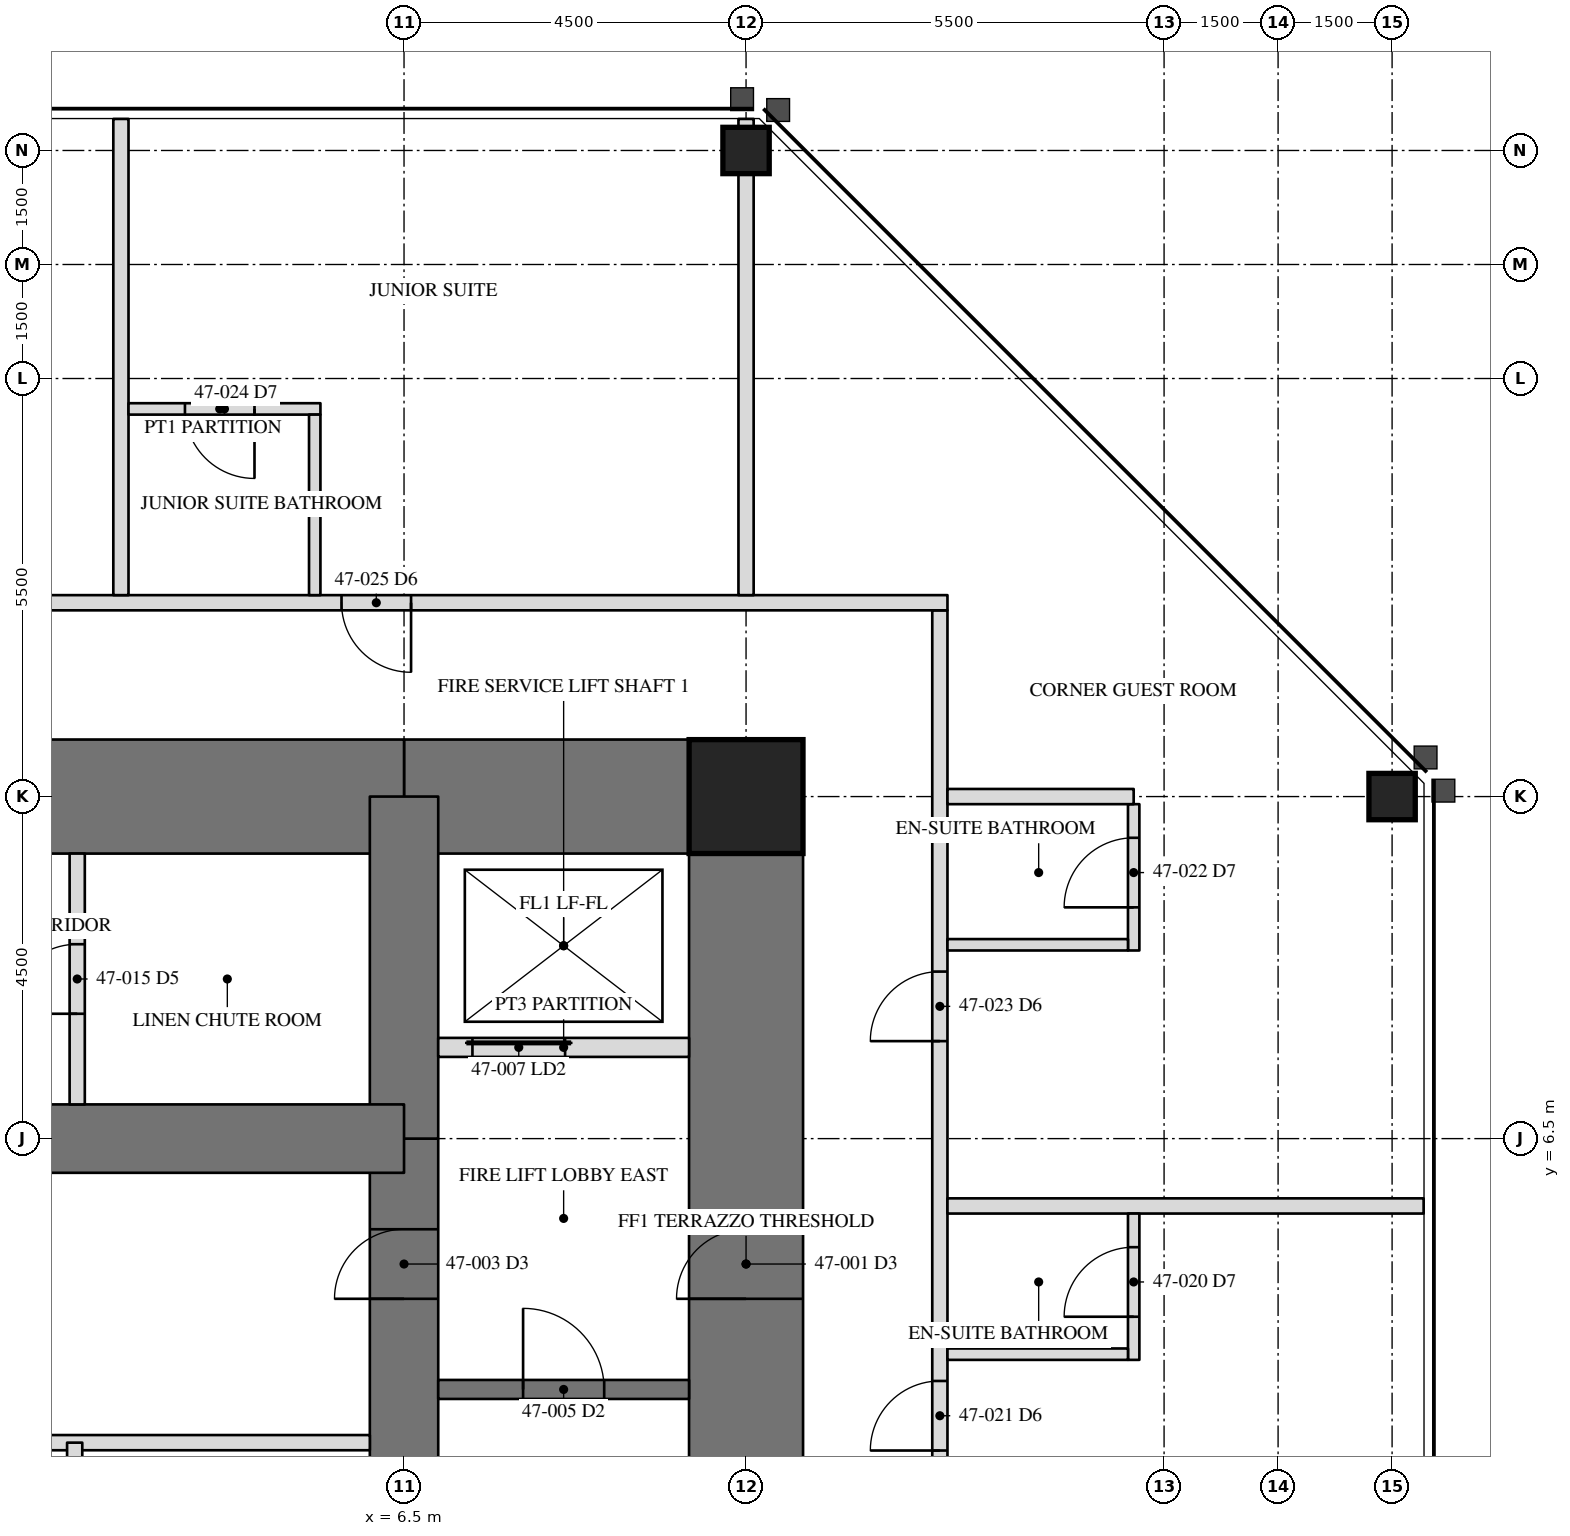
"""IFC4 building model, lengths in metres.
Left out: names, types, materials, properties, quantities, classifications, styles, units other than length and angle.
Written with IfcOpenShell. Run it as: python <this file> out.ifc"""

import sys

from ifc_helpers import new_model, si_unit, direction, frame, frame_2d, origin, origin_2d, place, context, subcontext, project, spatial, rectangle, hollow_rectangle, extrude, element, fill, save


model = new_model("IFC4")
c1 = context("Model", 3, precision=1e-05, world=origin(), true_north=direction((0.0, 1.0)))
c2 = subcontext(c1, "Body", "Model", "MODEL_VIEW")
j1 = project(units=[si_unit("LENGTHUNIT", "METRE"), si_unit("PLANEANGLEUNIT", "RADIAN")], contexts=[c1])
p1 = place(None, origin())
s1 = spatial("IfcSite", under=j1, at=p1, CompositionType="ELEMENT")
p2 = place(p1, origin())
s2 = spatial("IfcBuilding", under=s1, at=p2, CompositionType="ELEMENT")
p3 = place(p2, frame((0.0, 0.0, 201.2)))
s3 = spatial("IfcBuildingStorey", under=s2, at=p3, CompositionType="ELEMENT", Elevation=201.2)
for number, where, z_axis, x_axis in (
    (1, (19.5, 11.0, 0.0), (0.0, 0.0, 1.0), (0.0, 1.0, 0.0)),
    (2, (11.0, 19.5, 0.0), (0.0, 0.0, 1.0), (1.0, 0.0, 0.0)),
):
    element("IfcColumn", number, at=place(p3, frame(where, z_axis=z_axis, x_axis=x_axis)), inside=s3, PredefinedType="COLUMN", context=c2, shape_type="SweptSolid", body=[
        extrude(hollow_rectangle(XDim=0.61, YDim=0.61, WallThickness=0.076, at=origin_2d()), origin(), (0.0, 0.0, 1.0), 3.5),
    ])
p4 = place(p3, frame((11.0, -11.0, 0.0), z_axis=(0.0, 0.0, 1.0), x_axis=(0.0, 1.0, 0.0)))
e3 = element("IfcWall", 3, at=p4, inside=s3, PredefinedType="SHEAR", context=c2, shape_type="SweptSolid", body=[
    extrude(rectangle(XDim=22.0, YDim=1.5, at=frame_2d((11.0, 0.0))), origin(), (0.0, 0.0, 1.0), 3.5),
])
p5 = place(p4, frame((15.393, 0.0, 0.0)))
e4 = element("IfcOpeningElement", 4, at=p5, cuts=e3, PredefinedType="OPENING", context=c2, shape_type="SweptSolid", body=[
    extrude(rectangle(XDim=0.915, YDim=2.134, at=frame_2d((0.458, 1.067))), frame((0.0, 0.76, 0.0), z_axis=(0.0, -1.0, 0.0), x_axis=(1.0, 0.0, 0.0)), (0.0, 0.0, 1.0), 1.52),
])
p6 = place(p3, frame((11.0, 11.0, 0.0), z_axis=(0.0, 0.0, 1.0), x_axis=(-1.0, 0.0, 0.0)))
e5 = element("IfcWall", 5, at=p6, inside=s3, PredefinedType="SHEAR", context=c2, shape_type="SweptSolid", body=[
    extrude(rectangle(XDim=4.5, YDim=1.5, at=frame_2d((2.25, 0.0))), origin(), (0.0, 0.0, 1.0), 3.5),
])
p7 = place(p3, frame((6.5, 11.0, 0.0), z_axis=(0.0, 0.0, 1.0), x_axis=(-1.0, 0.0, 0.0)))
e6 = element("IfcWall", 6, at=p7, inside=s3, PredefinedType="SHEAR", context=c2, shape_type="SweptSolid", body=[
    extrude(rectangle(XDim=13.0, YDim=1.5, at=frame_2d((6.5, 0.0))), origin(), (0.0, 0.0, 1.0), 3.5),
])
p8 = place(p7, frame((6.042, 0.0, 0.0)))
e7 = element("IfcOpeningElement", 7, at=p8, cuts=e6, PredefinedType="OPENING", context=c2, shape_type="SweptSolid", body=[
    extrude(rectangle(XDim=0.915, YDim=2.134, at=frame_2d((0.458, 1.067))), frame((0.0, 0.76, 0.0), z_axis=(0.0, -1.0, 0.0), x_axis=(1.0, 0.0, 0.0)), (0.0, 0.0, 1.0), 1.52),
])
p9 = place(p3, frame((6.5, -6.5, 0.0), z_axis=(0.0, 0.0, 1.0), x_axis=(0.0, 1.0, 0.0)))
e8 = element("IfcWall", 8, at=p9, inside=s3, PredefinedType="SHEAR", context=c2, shape_type="SweptSolid", body=[
    extrude(rectangle(XDim=13.0, YDim=0.9, at=frame_2d((6.5, 0.0))), origin(), (0.0, 0.0, 1.0), 3.5),
])
p10 = place(p9, frame((10.893, 0.0, 0.0)))
e9 = element("IfcOpeningElement", 9, at=p10, cuts=e8, PredefinedType="OPENING", context=c2, shape_type="SweptSolid", body=[
    extrude(rectangle(XDim=0.915, YDim=2.134, at=frame_2d((0.458, 1.067))), frame((0.0, 0.46, 0.0), z_axis=(0.0, -1.0, 0.0), x_axis=(1.0, 0.0, 0.0)), (0.0, 0.0, 1.0), 0.92),
])
p11 = place(p9, frame((0.61, 0.0, 0.0)))
e10 = element("IfcOpeningElement", 10, at=p11, cuts=e8, PredefinedType="OPENING", context=c2, shape_type="SweptSolid", body=[
    extrude(rectangle(XDim=0.915, YDim=2.134, at=frame_2d((0.458, 1.067))), frame((0.0, 0.46, 0.0), z_axis=(0.0, -1.0, 0.0), x_axis=(1.0, 0.0, 0.0)), (0.0, 0.0, 1.0), 0.92),
])
p12 = place(p3, frame((6.5, 6.5, 0.0), z_axis=(0.0, 0.0, 1.0), x_axis=(0.0, 1.0, 0.0)))
e11 = element("IfcWall", 11, at=p12, inside=s3, PredefinedType="SHEAR", context=c2, shape_type="SweptSolid", body=[
    extrude(rectangle(XDim=4.5, YDim=0.9, at=frame_2d((2.25, 0.0))), origin(), (0.0, 0.0, 1.0), 3.5),
])
p13 = place(p3, frame((6.5, 6.5, 0.0), z_axis=(0.0, 0.0, 1.0), x_axis=(-1.0, 0.0, 0.0)))
e12 = element("IfcWall", 12, at=p13, inside=s3, PredefinedType="SHEAR", context=c2, shape_type="SweptSolid", body=[
    extrude(rectangle(XDim=13.0, YDim=0.9, at=frame_2d((6.5, 0.0))), origin(), (0.0, 0.0, 1.0), 3.5),
])
p14 = place(p3, frame((11.0, 11.0, 0.0), z_axis=(0.0, 0.0, 1.0), x_axis=(1.0, 0.0, 0.0)))
e13 = element("IfcColumn", 13, at=p14, inside=s3, PredefinedType="COLUMN", context=c2, shape_type="SweptSolid", body=[
    extrude(hollow_rectangle(XDim=1.499, YDim=1.499, WallThickness=0.102, at=origin_2d()), origin(), (0.0, 0.0, 1.0), 3.5),
])
p15 = place(p3, frame((6.95, 3.2, 0.0), z_axis=(0.0, 0.0, 1.0), x_axis=(1.0, 0.0, 0.0)))
e14 = element("IfcWall", 14, at=p15, inside=s3, PredefinedType="SOLIDWALL", context=c2, shape_type="SweptSolid", body=[
    extrude(rectangle(XDim=3.3, YDim=0.25, at=frame_2d((1.65, 0.0))), origin(), (0.0, 0.0, 1.0), 3.31),
])
p16 = place(p15, frame((1.116, 0.0, 0.0)))
e15 = element("IfcOpeningElement", 15, at=p16, cuts=e14, PredefinedType="OPENING", context=c2, shape_type="SweptSolid", body=[
    extrude(rectangle(XDim=1.067, YDim=2.134, at=frame_2d((0.533, 1.067))), frame((0.0, 0.135, 0.0), z_axis=(0.0, -1.0, 0.0), x_axis=(1.0, 0.0, 0.0)), (0.0, 0.0, 1.0), 0.27),
])
p17 = place(p3, frame((6.95, 7.7, 0.0), z_axis=(0.0, 0.0, 1.0), x_axis=(1.0, 0.0, 0.0)))
e16 = element("IfcWall", 16, at=p17, inside=s3, PredefinedType="PARTITIONING", context=c2, shape_type="SweptSolid", body=[
    extrude(rectangle(XDim=3.3, YDim=0.25, at=frame_2d((1.65, 0.0))), origin(), (0.0, 0.0, 1.0), 3.31),
])
p18 = place(p17, frame((0.45, 0.0, 0.0)))
e17 = element("IfcOpeningElement", 17, at=p18, cuts=e16, PredefinedType="OPENING", context=c2, shape_type="SweptSolid", body=[
    extrude(rectangle(XDim=1.219, YDim=2.134, at=frame_2d((0.609, 1.067))), frame((0.0, 0.135, 0.0), z_axis=(0.0, -1.0, 0.0), x_axis=(1.0, 0.0, 0.0)), (0.0, 0.0, 1.0), 0.27),
])
p19 = place(p3, frame((-6.05, 2.5, 0.0), z_axis=(0.0, 0.0, 1.0), x_axis=(1.0, 0.0, 0.0)))
e18 = element("IfcWall", 18, at=p19, inside=s3, PredefinedType="PARTITIONING", context=c2, shape_type="SweptSolid", body=[
    extrude(rectangle(XDim=12.1, YDim=0.2, at=frame_2d((6.05, 0.0))), origin(), (0.0, 0.0, 1.0), 3.31),
])
p20 = place(p3, frame((2.167, -2.5, 0.0), z_axis=(0.0, 0.0, 1.0), x_axis=(0.0, 1.0, 0.0)))
e19 = element("IfcWall", 19, at=p20, inside=s3, PredefinedType="PARTITIONING", context=c2, shape_type="SweptSolid", body=[
    extrude(rectangle(XDim=5.0, YDim=0.2, at=frame_2d((2.5, 0.0))), origin(), (0.0, 0.0, 1.0), 3.31),
])
p21 = place(p3, frame((2.2, 6.95, 0.0), z_axis=(0.0, 0.0, 1.0), x_axis=(0.0, 1.0, 0.0)))
e20 = element("IfcWall", 20, at=p21, inside=s3, PredefinedType="PARTITIONING", context=c2, shape_type="SweptSolid", body=[
    extrude(rectangle(XDim=3.3, YDim=0.2, at=frame_2d((1.65, 0.0))), origin(), (0.0, 0.0, 1.0), 3.31),
])
p22 = place(p21, frame((1.192, 0.0, 0.0)))
e21 = element("IfcOpeningElement", 21, at=p22, cuts=e20, PredefinedType="OPENING", context=c2, shape_type="SweptSolid", body=[
    extrude(rectangle(XDim=0.915, YDim=2.134, at=frame_2d((0.458, 1.067))), frame((0.0, 0.11, 0.0), z_axis=(0.0, -1.0, 0.0), x_axis=(1.0, 0.0, 0.0)), (0.0, 0.0, 1.0), 0.22),
])
p23 = place(p3, frame((13.55, -13.65, 0.0), z_axis=(0.0, 0.0, 1.0), x_axis=(0.0, 1.0, 0.0)))
e22 = element("IfcWall", 22, at=p23, inside=s3, PredefinedType="PARTITIONING", context=c2, shape_type="SweptSolid", body=[
    extrude(rectangle(XDim=27.1, YDim=0.2, at=frame_2d((13.55, 0.0))), origin(), (0.0, 0.0, 1.0), 3.31),
])
p24 = place(p23, frame((4.283, 0.0, 0.0)))
e23 = element("IfcOpeningElement", 23, at=p24, cuts=e22, PredefinedType="OPENING", context=c2, shape_type="SweptSolid", body=[
    extrude(rectangle(XDim=0.915, YDim=2.134, at=frame_2d((0.458, 1.067))), frame((0.0, 0.11, 0.0), z_axis=(0.0, -1.0, 0.0), x_axis=(1.0, 0.0, 0.0)), (0.0, 0.0, 1.0), 0.22),
])
p25 = place(p23, frame((10.433, 0.0, 0.0)))
e24 = element("IfcOpeningElement", 24, at=p25, cuts=e22, PredefinedType="OPENING", context=c2, shape_type="SweptSolid", body=[
    extrude(rectangle(XDim=0.915, YDim=2.134, at=frame_2d((0.458, 1.067))), frame((0.0, 0.11, 0.0), z_axis=(0.0, -1.0, 0.0), x_axis=(1.0, 0.0, 0.0)), (0.0, 0.0, 1.0), 0.22),
])
p26 = place(p23, frame((16.046, 0.0, 0.0)))
e25 = element("IfcOpeningElement", 25, at=p26, cuts=e22, PredefinedType="OPENING", context=c2, shape_type="SweptSolid", body=[
    extrude(rectangle(XDim=0.915, YDim=2.134, at=frame_2d((0.458, 1.067))), frame((0.0, 0.11, 0.0), z_axis=(0.0, -1.0, 0.0), x_axis=(1.0, 0.0, 0.0)), (0.0, 0.0, 1.0), 0.22),
])
p27 = place(p23, frame((21.433, 0.0, 0.0)))
e26 = element("IfcOpeningElement", 26, at=p27, cuts=e22, PredefinedType="OPENING", context=c2, shape_type="SweptSolid", body=[
    extrude(rectangle(XDim=0.915, YDim=2.134, at=frame_2d((0.458, 1.067))), frame((0.0, 0.11, 0.0), z_axis=(0.0, -1.0, 0.0), x_axis=(1.0, 0.0, 0.0)), (0.0, 0.0, 1.0), 0.22),
])
p28 = place(p3, frame((13.65, 13.55, 0.0), z_axis=(0.0, 0.0, 1.0), x_axis=(-1.0, 0.0, 0.0)))
e27 = element("IfcWall", 27, at=p28, inside=s3, PredefinedType="PARTITIONING", context=c2, shape_type="SweptSolid", body=[
    extrude(rectangle(XDim=27.1, YDim=0.2, at=frame_2d((13.55, 0.0))), origin(), (0.0, 0.0, 1.0), 3.31),
])
p29 = place(p28, frame((7.058, 0.0, 0.0)))
e28 = element("IfcOpeningElement", 28, at=p29, cuts=e27, PredefinedType="OPENING", context=c2, shape_type="SweptSolid", body=[
    extrude(rectangle(XDim=0.915, YDim=2.134, at=frame_2d((0.458, 1.067))), frame((0.0, 0.11, 0.0), z_axis=(0.0, -1.0, 0.0), x_axis=(1.0, 0.0, 0.0)), (0.0, 0.0, 1.0), 0.22),
])
p30 = place(p28, frame((13.24, 0.0, 0.0)))
e29 = element("IfcOpeningElement", 29, at=p30, cuts=e27, PredefinedType="OPENING", context=c2, shape_type="SweptSolid", body=[
    extrude(rectangle(XDim=0.915, YDim=2.134, at=frame_2d((0.458, 1.067))), frame((0.0, 0.11, 0.0), z_axis=(0.0, -1.0, 0.0), x_axis=(1.0, 0.0, 0.0)), (0.0, 0.0, 1.0), 0.22),
])
p31 = place(p28, frame((20.833, 0.0, 0.0)))
e30 = element("IfcOpeningElement", 30, at=p31, cuts=e27, PredefinedType="OPENING", context=c2, shape_type="SweptSolid", body=[
    extrude(rectangle(XDim=0.915, YDim=2.134, at=frame_2d((0.458, 1.067))), frame((0.0, 0.11, 0.0), z_axis=(0.0, -1.0, 0.0), x_axis=(1.0, 0.0, 0.0)), (0.0, 0.0, 1.0), 0.22),
])
p32 = place(p3, frame((13.65, 5.614, 0.0), z_axis=(0.0, 0.0, 1.0), x_axis=(1.0, 0.0, 0.0)))
e31 = element("IfcWall", 31, at=p32, inside=s3, PredefinedType="PARTITIONING", context=c2, shape_type="SweptSolid", body=[
    extrude(rectangle(XDim=6.265, YDim=0.2, at=frame_2d((3.133, 0.0))), origin(), (0.0, 0.0, 1.0), 3.31),
])
p33 = place(p3, frame((16.1, 3.589, 0.0), z_axis=(0.0, 0.0, 1.0), x_axis=(0.0, 1.0, 0.0)))
e32 = element("IfcWall", 32, at=p33, inside=s3, PredefinedType="PARTITIONING", context=c2, shape_type="SweptSolid", body=[
    extrude(rectangle(XDim=1.925, YDim=0.15, at=frame_2d((0.962, 0.0))), origin(), (0.0, 0.0, 1.0), 3.31),
])
p34 = place(p33, frame((0.567, 0.0, 0.0)))
e33 = element("IfcOpeningElement", 33, at=p34, cuts=e32, PredefinedType="OPENING", context=c2, shape_type="SweptSolid", body=[
    extrude(rectangle(XDim=0.915, YDim=2.032, at=frame_2d((0.458, 1.016))), frame((0.0, 0.085, 0.0), z_axis=(0.0, -1.0, 0.0), x_axis=(1.0, 0.0, 0.0)), (0.0, 0.0, 1.0), 0.17),
])
p35 = place(p3, frame((13.65, 3.664, 0.0), z_axis=(0.0, 0.0, 1.0), x_axis=(1.0, 0.0, 0.0)))
e34 = element("IfcWall", 34, at=p35, inside=s3, PredefinedType="PARTITIONING", context=c2, shape_type="SweptSolid", body=[
    extrude(rectangle(XDim=2.375, YDim=0.15, at=frame_2d((1.188, 0.0))), origin(), (0.0, 0.0, 1.0), 2.703),
])
p36 = place(p3, frame((16.1, 8.975, 0.0), z_axis=(0.0, 0.0, 1.0), x_axis=(0.0, 1.0, 0.0)))
e35 = element("IfcWall", 35, at=p36, inside=s3, PredefinedType="PARTITIONING", context=c2, shape_type="SweptSolid", body=[
    extrude(rectangle(XDim=1.925, YDim=0.15, at=frame_2d((0.962, 0.0))), origin(), (0.0, 0.0, 1.0), 3.31),
])
p37 = place(p36, frame((0.567, 0.0, 0.0)))
e36 = element("IfcOpeningElement", 36, at=p37, cuts=e35, PredefinedType="OPENING", context=c2, shape_type="SweptSolid", body=[
    extrude(rectangle(XDim=0.915, YDim=2.032, at=frame_2d((0.458, 1.016))), frame((0.0, 0.085, 0.0), z_axis=(0.0, -1.0, 0.0), x_axis=(1.0, 0.0, 0.0)), (0.0, 0.0, 1.0), 0.17),
])
p38 = place(p3, frame((13.65, 9.05, 0.0), z_axis=(0.0, 0.0, 1.0), x_axis=(1.0, 0.0, 0.0)))
e37 = element("IfcWall", 37, at=p38, inside=s3, PredefinedType="PARTITIONING", context=c2, shape_type="SweptSolid", body=[
    extrude(rectangle(XDim=2.375, YDim=0.15, at=frame_2d((1.188, 0.0))), origin(), (0.0, 0.0, 1.0), 3.31),
])
p39 = place(p3, frame((13.65, 11.0, 0.0), z_axis=(0.0, 0.0, 1.0), x_axis=(1.0, 0.0, 0.0)))
e38 = element("IfcWall", 38, at=p39, inside=s3, PredefinedType="PARTITIONING", context=c2, shape_type="SweptSolid", body=[
    extrude(rectangle(XDim=2.45, YDim=0.2, at=frame_2d((1.225, 0.0))), origin(), (0.0, 0.0, 1.0), 2.802),
])
p40 = place(p3, frame((11.0, 13.65, 0.0), z_axis=(0.0, 0.0, 1.0), x_axis=(0.0, 1.0, 0.0)))
e39 = element("IfcWall", 39, at=p40, inside=s3, PredefinedType="PARTITIONING", context=c2, shape_type="SweptSolid", body=[
    extrude(rectangle(XDim=6.265, YDim=0.2, at=frame_2d((3.133, 0.0))), origin(), (0.0, 0.0, 1.0), 2.802),
])
p41 = place(p3, frame((2.775, 13.65, 0.0), z_axis=(0.0, 0.0, 1.0), x_axis=(0.0, 1.0, 0.0)))
e40 = element("IfcWall", 40, at=p41, inside=s3, PredefinedType="PARTITIONING", context=c2, shape_type="SweptSolid", body=[
    extrude(rectangle(XDim=6.265, YDim=0.2, at=frame_2d((3.133, 0.0))), origin(), (0.0, 0.0, 1.0), 3.31),
])
p42 = place(p3, frame((5.4, 16.1, 0.0), z_axis=(0.0, 0.0, 1.0), x_axis=(-1.0, 0.0, 0.0)))
e41 = element("IfcWall", 41, at=p42, inside=s3, PredefinedType="PARTITIONING", context=c2, shape_type="SweptSolid", body=[
    extrude(rectangle(XDim=2.525, YDim=0.15, at=frame_2d((1.262, 0.0))), origin(), (0.0, 0.0, 1.0), 3.31),
])
p43 = place(p42, frame((0.867, 0.0, 0.0)))
e42 = element("IfcOpeningElement", 42, at=p43, cuts=e41, PredefinedType="OPENING", context=c2, shape_type="SweptSolid", body=[
    extrude(rectangle(XDim=0.915, YDim=2.032, at=frame_2d((0.458, 1.016))), frame((0.0, 0.085, 0.0), z_axis=(0.0, -1.0, 0.0), x_axis=(1.0, 0.0, 0.0)), (0.0, 0.0, 1.0), 0.17),
])
p44 = place(p3, frame((5.325, 13.65, 0.0), z_axis=(0.0, 0.0, 1.0), x_axis=(0.0, 1.0, 0.0)))
e43 = element("IfcWall", 43, at=p44, inside=s3, PredefinedType="PARTITIONING", context=c2, shape_type="SweptSolid", body=[
    extrude(rectangle(XDim=2.375, YDim=0.15, at=frame_2d((1.188, 0.0))), origin(), (0.0, 0.0, 1.0), 3.31),
])
p45 = place(p5, origin())
e44 = element("IfcDoor", 44, at=p45, inside=s3, OperationType="SINGLE_SWING_RIGHT", PredefinedType="DOOR", context=c2, shape_type="SweptSolid", body=[
    extrude(rectangle(XDim=0.915, YDim=2.134, at=frame_2d((0.458, 1.067))), frame((0.0, -0.675, 0.0), z_axis=(0.0, -1.0, 0.0), x_axis=(1.0, 0.0, 0.0)), (0.0, 0.0, 1.0), 0.05),
])
fill(e4, e44)
p46 = place(p10, origin())
e45 = element("IfcDoor", 45, at=p46, inside=s3, OperationType="SINGLE_SWING_RIGHT", PredefinedType="DOOR", context=c2, shape_type="SweptSolid", body=[
    extrude(rectangle(XDim=0.915, YDim=2.134, at=frame_2d((0.458, 1.067))), frame((0.0, -0.375, 0.0), z_axis=(0.0, -1.0, 0.0), x_axis=(1.0, 0.0, 0.0)), (0.0, 0.0, 1.0), 0.05),
])
fill(e9, e45)
p47 = place(p16, origin())
e46 = element("IfcDoor", 46, at=p47, inside=s3, OperationType="SINGLE_SWING_LEFT", PredefinedType="DOOR", context=c2, shape_type="SweptSolid", body=[
    extrude(rectangle(XDim=1.067, YDim=2.134, at=frame_2d((0.533, 1.067))), frame((0.0, 0.025, 0.0), z_axis=(0.0, -1.0, 0.0), x_axis=(1.0, 0.0, 0.0)), (0.0, 0.0, 1.0), 0.05),
])
fill(e15, e46)
p48 = place(p18, origin())
e47 = element("IfcDoor", 47, at=p48, inside=s3, OperationType="SLIDING_TO_LEFT", PredefinedType="DOOR", context=c2, shape_type="SweptSolid", body=[
    extrude(rectangle(XDim=1.219, YDim=2.134, at=frame_2d((0.609, 1.067))), frame((0.0, 0.025, 0.0), z_axis=(0.0, -1.0, 0.0), x_axis=(1.0, 0.0, 0.0)), (0.0, 0.0, 1.0), 0.05),
])
fill(e17, e47)
p49 = place(p22, origin())
e48 = element("IfcDoor", 48, at=p49, inside=s3, OperationType="SINGLE_SWING_RIGHT", PredefinedType="DOOR", context=c2, shape_type="SweptSolid", body=[
    extrude(rectangle(XDim=0.915, YDim=2.134, at=frame_2d((0.458, 1.067))), frame((0.0, 0.025, 0.0), z_axis=(0.0, -1.0, 0.0), x_axis=(1.0, 0.0, 0.0)), (0.0, 0.0, 1.0), 0.05),
])
fill(e21, e48)
p50 = place(p34, origin())
e49 = element("IfcDoor", 49, at=p50, inside=s3, OperationType="SINGLE_SWING_LEFT", PredefinedType="DOOR", context=c2, shape_type="SweptSolid", body=[
    extrude(rectangle(XDim=0.915, YDim=2.032, at=frame_2d((0.458, 1.016))), frame((0.0, 0.025, 0.0), z_axis=(0.0, -1.0, 0.0), x_axis=(1.0, 0.0, 0.0)), (0.0, 0.0, 1.0), 0.05),
])
fill(e33, e49)
p51 = place(p26, origin())
e50 = element("IfcDoor", 50, at=p51, inside=s3, OperationType="SINGLE_SWING_LEFT", PredefinedType="DOOR", context=c2, shape_type="SweptSolid", body=[
    extrude(rectangle(XDim=0.915, YDim=2.134, at=frame_2d((0.458, 1.067))), frame((0.0, 0.025, 0.0), z_axis=(0.0, -1.0, 0.0), x_axis=(1.0, 0.0, 0.0)), (0.0, 0.0, 1.0), 0.05),
])
fill(e25, e50)
p52 = place(p37, origin())
e51 = element("IfcDoor", 51, at=p52, inside=s3, OperationType="SINGLE_SWING_LEFT", PredefinedType="DOOR", context=c2, shape_type="SweptSolid", body=[
    extrude(rectangle(XDim=0.915, YDim=2.032, at=frame_2d((0.458, 1.016))), frame((0.0, 0.025, 0.0), z_axis=(0.0, -1.0, 0.0), x_axis=(1.0, 0.0, 0.0)), (0.0, 0.0, 1.0), 0.05),
])
fill(e36, e51)
p53 = place(p27, origin())
e52 = element("IfcDoor", 52, at=p53, inside=s3, OperationType="SINGLE_SWING_LEFT", PredefinedType="DOOR", context=c2, shape_type="SweptSolid", body=[
    extrude(rectangle(XDim=0.915, YDim=2.134, at=frame_2d((0.458, 1.067))), frame((0.0, 0.025, 0.0), z_axis=(0.0, -1.0, 0.0), x_axis=(1.0, 0.0, 0.0)), (0.0, 0.0, 1.0), 0.05),
])
fill(e26, e52)
p54 = place(p43, origin())
e53 = element("IfcDoor", 53, at=p54, inside=s3, OperationType="SINGLE_SWING_LEFT", PredefinedType="DOOR", context=c2, shape_type="SweptSolid", body=[
    extrude(rectangle(XDim=0.915, YDim=2.032, at=frame_2d((0.458, 1.016))), frame((0.0, 0.025, 0.0), z_axis=(0.0, -1.0, 0.0), x_axis=(1.0, 0.0, 0.0)), (0.0, 0.0, 1.0), 0.05),
])
fill(e42, e53)
p55 = place(p29, origin())
e54 = element("IfcDoor", 54, at=p55, inside=s3, OperationType="SINGLE_SWING_LEFT", PredefinedType="DOOR", context=c2, shape_type="SweptSolid", body=[
    extrude(rectangle(XDim=0.915, YDim=2.134, at=frame_2d((0.458, 1.067))), frame((0.0, 0.025, 0.0), z_axis=(0.0, -1.0, 0.0), x_axis=(1.0, 0.0, 0.0)), (0.0, 0.0, 1.0), 0.05),
])
fill(e28, e54)
save(model, sys.argv[1])
